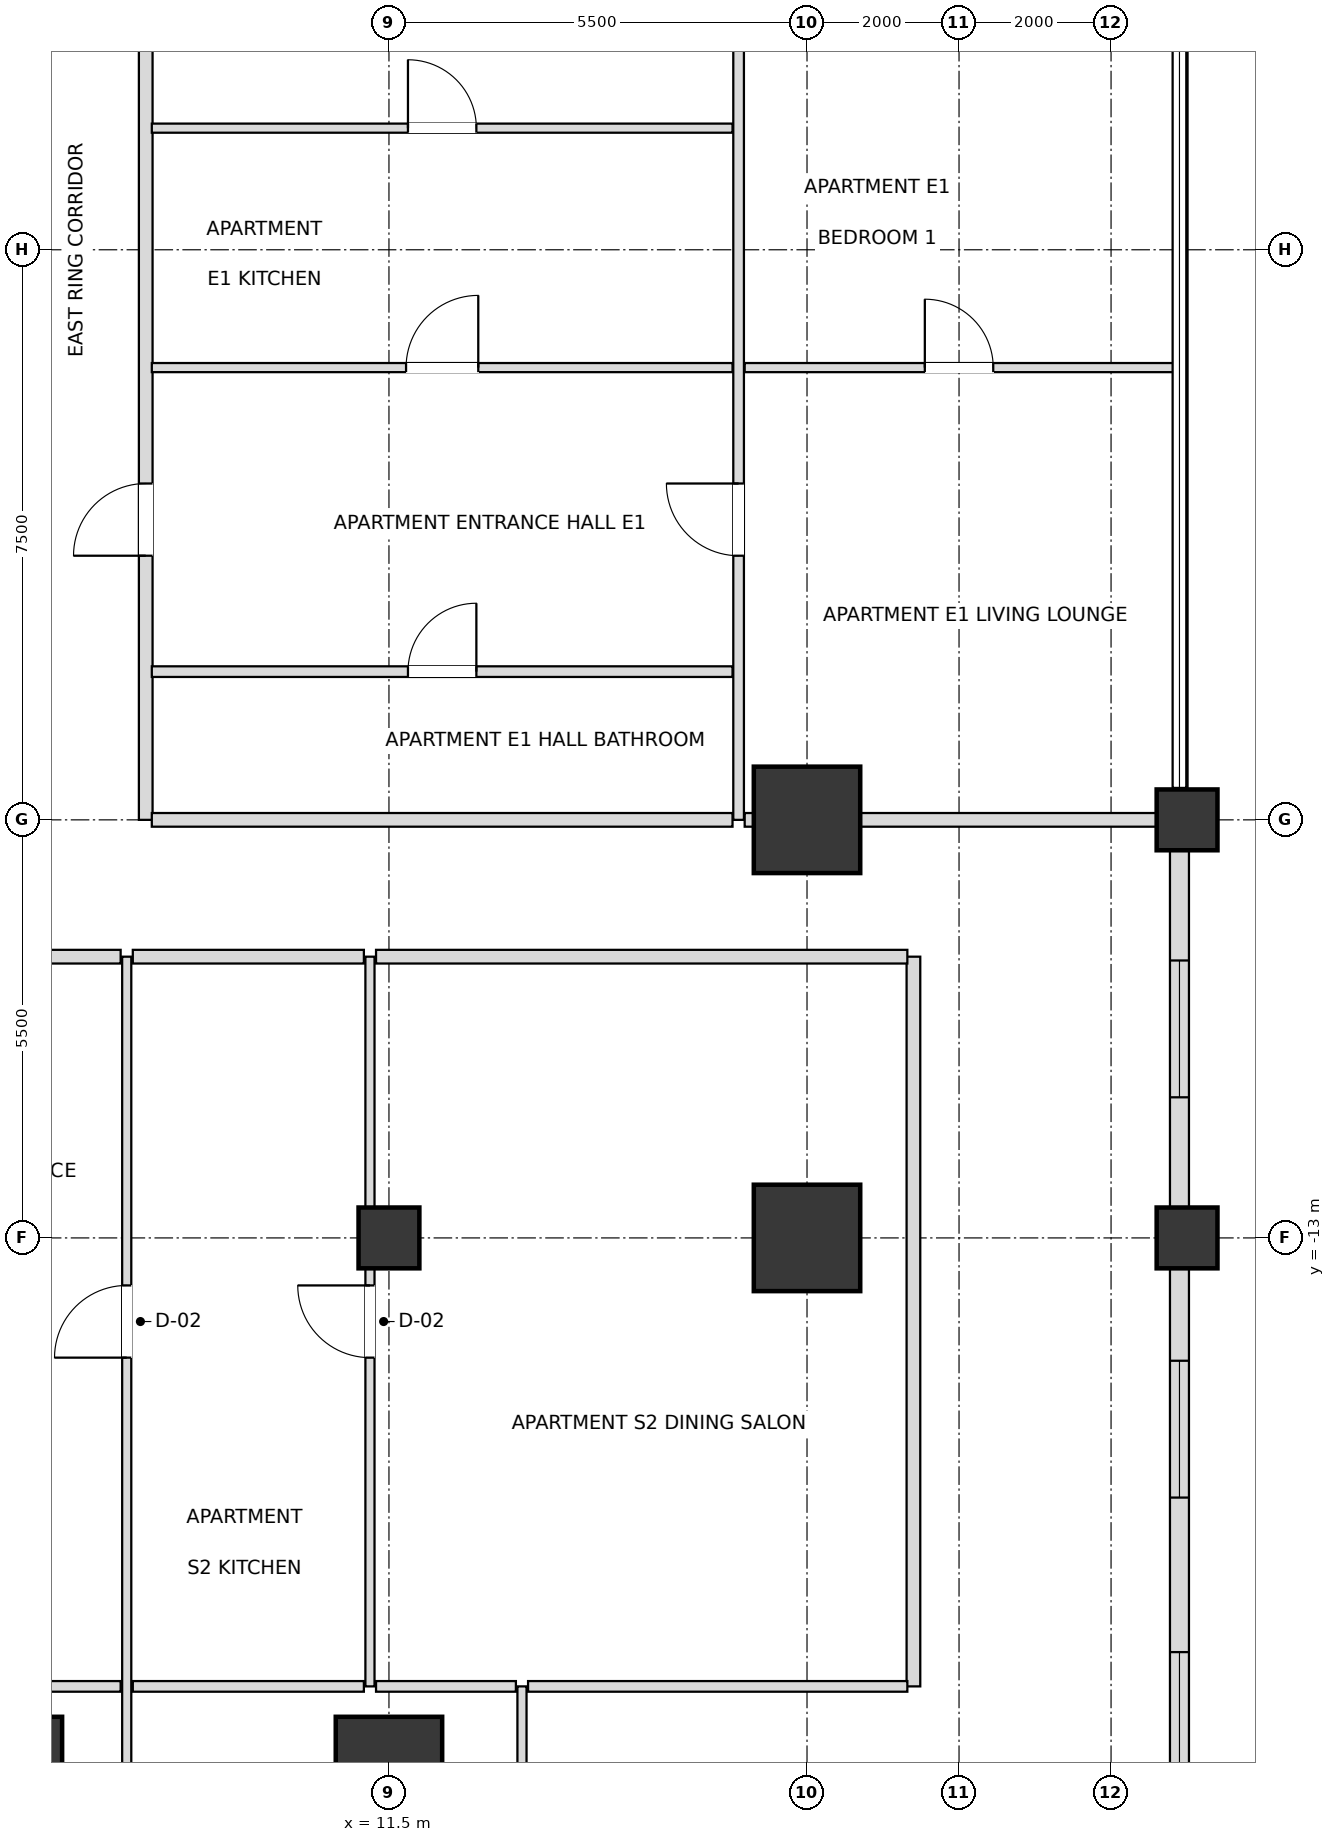
"""IFC4 building model, lengths in metres.
Left out: names, types, materials, properties, quantities, classifications, styles, units other than length and angle.
Written with IfcOpenShell. Run it as: python <this file> out.ifc"""

import sys

from ifc_helpers import new_model, si_unit, direction, frame, frame_2d, origin, origin_2d, place, context, subcontext, project, spatial, rectangle, extrude, element, fill, save


model = new_model("IFC4")
c1 = context("Model", 3, precision=1e-05, world=origin(), true_north=direction((0.0, 1.0)))
c2 = subcontext(c1, "Body", "Model", "MODEL_VIEW")
j1 = project(units=[si_unit("LENGTHUNIT", "METRE"), si_unit("PLANEANGLEUNIT", "RADIAN")], contexts=[c1])
p1 = place(None, origin())
s1 = spatial("IfcSite", under=j1, at=p1, CompositionType="ELEMENT")
p2 = place(p1, origin())
s2 = spatial("IfcBuilding", under=s1, at=p2, CompositionType="ELEMENT")
p3 = place(p2, frame((0.0, 0.0, 54.0)))
s3 = spatial("IfcBuildingStorey", under=s2, at=p3, CompositionType="ELEMENT", Elevation=54.0)
for number, where, z_axis, x_axis in (
    (1, (6.5, -20.0, 0.0), (0.0, 0.0, 1.0), (1.0, 0.0, 0.0)),
    (2, (11.5, -20.0, 0.0), (0.0, 0.0, 1.0), (1.0, 0.0, 0.0)),
    (3, (17.0, -13.0, 0.0), (0.0, 0.0, 1.0), (1.0, 0.0, 0.0)),
    (4, (17.0, -7.5, 0.0), (0.0, 0.0, 1.0), (1.0, 0.0, 0.0)),
):
    element("IfcColumn", number, at=place(p3, frame(where, z_axis=z_axis, x_axis=x_axis)), inside=s3, PredefinedType="USERDEFINED", context=c2, shape_type="SweptSolid", body=[
        extrude(rectangle(XDim=1.4, YDim=1.4, at=origin_2d()), origin(), (0.0, 0.0, 1.0), 3.6),
    ])
for number, where, z_axis, x_axis in (
    (5, (11.5, -13.0, 0.0), (0.0, 0.0, 1.0), (1.0, 0.0, 0.0)),
    (6, (22.0, -13.0, 0.0), (0.0, 0.0, 1.0), (1.0, 0.0, 0.0)),
    (7, (22.0, -7.5, 0.0), (0.0, 0.0, 1.0), (1.0, 0.0, 0.0)),
):
    element("IfcColumn", number, at=place(p3, frame(where, z_axis=z_axis, x_axis=x_axis)), inside=s3, PredefinedType="COLUMN", context=c2, shape_type="SweptSolid", body=[
        extrude(rectangle(XDim=0.8, YDim=0.8, at=origin_2d()), origin(), (0.0, 0.0, 1.0), 3.6),
    ])
p4 = place(p3, frame((21.9, -21.425, 0.0), z_axis=(0.0, 0.0, 1.0), x_axis=(0.0, 1.0, 0.0)))
e8 = element("IfcWall", 8, at=p4, inside=s3, PredefinedType="SOLIDWALL", context=c2, shape_type="SweptSolid", body=[
    extrude(rectangle(XDim=8.03, YDim=0.25, at=frame_2d((4.015, 0.0))), origin(), (0.0, 0.0, 1.0), 2.736),
])
p5 = place(p4, frame((1.176, 0.0, 0.72)))
e9 = element("IfcOpeningElement", 9, at=p5, cuts=e8, PredefinedType="OPENING", context=c2, shape_type="SweptSolid", body=[
    extrude(rectangle(XDim=1.8, YDim=1.68, at=frame_2d((0.9, 0.84))), frame((0.0, 0.135, 0.0), z_axis=(0.0, -1.0, 0.0), x_axis=(1.0, 0.0, 0.0)), (0.0, 0.0, 1.0), 0.27),
])
p6 = place(p4, frame((5.009, 0.0, 0.72)))
e10 = element("IfcOpeningElement", 10, at=p6, cuts=e8, PredefinedType="OPENING", context=c2, shape_type="SweptSolid", body=[
    extrude(rectangle(XDim=1.8, YDim=1.68, at=frame_2d((0.9, 0.84))), frame((0.0, 0.135, 0.0), z_axis=(0.0, -1.0, 0.0), x_axis=(1.0, 0.0, 0.0)), (0.0, 0.0, 1.0), 0.27),
])
p7 = place(p3, frame((21.9, -12.605, 0.0), z_axis=(0.0, 0.0, 1.0), x_axis=(0.0, 1.0, 0.0)))
e11 = element("IfcWall", 11, at=p7, inside=s3, PredefinedType="SOLIDWALL", context=c2, shape_type="SweptSolid", body=[
    extrude(rectangle(XDim=4.71, YDim=0.25, at=frame_2d((2.355, 0.0))), origin(), (0.0, 0.0, 1.0), 2.736),
])
p8 = place(p7, frame((1.455, 0.0, 0.72)))
e12 = element("IfcOpeningElement", 12, at=p8, cuts=e11, PredefinedType="OPENING", context=c2, shape_type="SweptSolid", body=[
    extrude(rectangle(XDim=1.8, YDim=1.68, at=frame_2d((0.9, 0.84))), frame((0.0, 0.135, 0.0), z_axis=(0.0, -1.0, 0.0), x_axis=(1.0, 0.0, 0.0)), (0.0, 0.0, 1.0), 0.27),
])
p9 = place(p3, frame((8.05, -24.9, 0.0), z_axis=(0.0, 0.0, 1.0), x_axis=(0.0, 1.0, 0.0)))
e13 = element("IfcWall", 13, at=p9, inside=s3, PredefinedType="PARTITIONING", context=c2, shape_type="SweptSolid", body=[
    extrude(rectangle(XDim=15.6, YDim=0.12, at=frame_2d((7.8, 0.0))), origin(), (0.0, 0.0, 1.0), 2.816),
])
p10 = place(p9, frame((10.325, 0.0, 0.0)))
e14 = element("IfcOpeningElement", 14, at=p10, cuts=e13, PredefinedType="OPENING", context=c2, shape_type="SweptSolid", body=[
    extrude(rectangle(XDim=0.95, YDim=2.1, at=frame_2d((0.475, 1.05))), frame((0.0, 0.07, 0.0), z_axis=(0.0, -1.0, 0.0), x_axis=(1.0, 0.0, 0.0)), (0.0, 0.0, 1.0), 0.14),
])
p11 = place(p9, frame((2.55, 0.0, 0.0)))
e15 = element("IfcOpeningElement", 15, at=p11, cuts=e13, PredefinedType="OPENING", context=c2, shape_type="SweptSolid", body=[
    extrude(rectangle(XDim=0.9, YDim=2.1, at=frame_2d((0.45, 1.05))), frame((0.0, 0.07, 0.0), z_axis=(0.0, -1.0, 0.0), x_axis=(1.0, 0.0, 0.0)), (0.0, 0.0, 1.0), 0.14),
])
p12 = place(p3, frame((8.3, -7.5, 0.0), z_axis=(0.0, 0.0, 1.0), x_axis=(0.0, 1.0, 0.0)))
e16 = element("IfcWall", 16, at=p12, inside=s3, PredefinedType="PARTITIONING", context=c2, shape_type="SweptSolid", body=[
    extrude(rectangle(XDim=15.0, YDim=0.18, at=frame_2d((7.5, 0.0))), origin(), (0.0, 0.0, 1.0), 3.38),
])
p13 = place(p12, frame((3.475, 0.0, 0.0)))
e17 = element("IfcOpeningElement", 17, at=p13, cuts=e16, PredefinedType="OPENING", context=c2, shape_type="SweptSolid", body=[
    extrude(rectangle(XDim=0.95, YDim=2.15, at=frame_2d((0.475, 1.075))), frame((0.0, 0.1, 0.0), z_axis=(0.0, -1.0, 0.0), x_axis=(1.0, 0.0, 0.0)), (0.0, 0.0, 1.0), 0.2),
])
p14 = place(p3, frame((11.25, -18.9, 0.0), z_axis=(0.0, 0.0, 1.0), x_axis=(0.0, 1.0, 0.0)))
e18 = element("IfcWall", 18, at=p14, inside=s3, PredefinedType="PARTITIONING", context=c2, shape_type="SweptSolid", body=[
    extrude(rectangle(XDim=9.6, YDim=0.12, at=frame_2d((4.8, 0.0))), origin(), (0.0, 0.0, 1.0), 2.736),
])
p15 = place(p14, frame((4.325, 0.0, 0.0)))
e19 = element("IfcOpeningElement", 19, at=p15, cuts=e18, PredefinedType="OPENING", context=c2, shape_type="SweptSolid", body=[
    extrude(rectangle(XDim=0.95, YDim=2.1, at=frame_2d((0.475, 1.05))), frame((0.0, 0.07, 0.0), z_axis=(0.0, -1.0, 0.0), x_axis=(1.0, 0.0, 0.0)), (0.0, 0.0, 1.0), 0.14),
])
p16 = place(p3, frame((13.25, -24.9, 0.0), z_axis=(0.0, 0.0, 1.0), x_axis=(0.0, 1.0, 0.0)))
e20 = element("IfcWall", 20, at=p16, inside=s3, PredefinedType="PARTITIONING", context=c2, shape_type="SweptSolid", body=[
    extrude(rectangle(XDim=6.0, YDim=0.12, at=frame_2d((3.0, 0.0))), origin(), (0.0, 0.0, 1.0), 2.736),
])
p17 = place(p16, frame((2.55, 0.0, 0.0)))
e21 = element("IfcOpeningElement", 21, at=p17, cuts=e20, PredefinedType="OPENING", context=c2, shape_type="SweptSolid", body=[
    extrude(rectangle(XDim=0.9, YDim=2.1, at=frame_2d((0.45, 1.05))), frame((0.0, 0.07, 0.0), z_axis=(0.0, -1.0, 0.0), x_axis=(1.0, 0.0, 0.0)), (0.0, 0.0, 1.0), 0.14),
])
p18 = place(p3, frame((16.1, -7.5, 0.0), z_axis=(0.0, 0.0, 1.0), x_axis=(0.0, 1.0, 0.0)))
e22 = element("IfcWall", 22, at=p18, inside=s3, PredefinedType="PARTITIONING", context=c2, shape_type="SweptSolid", body=[
    extrude(rectangle(XDim=15.0, YDim=0.14, at=frame_2d((7.5, 0.0))), origin(), (0.0, 0.0, 1.0), 3.38),
])
p19 = place(p18, frame((3.475, 0.0, 0.0)))
e23 = element("IfcOpeningElement", 23, at=p19, cuts=e22, PredefinedType="OPENING", context=c2, shape_type="SweptSolid", body=[
    extrude(rectangle(XDim=0.95, YDim=2.1, at=frame_2d((0.475, 1.05))), frame((0.0, 0.08, 0.0), z_axis=(0.0, -1.0, 0.0), x_axis=(1.0, 0.0, 0.0)), (0.0, 0.0, 1.0), 0.16),
])
p20 = place(p3, frame((18.4, -18.9, 0.0), z_axis=(0.0, 0.0, 1.0), x_axis=(0.0, 1.0, 0.0)))
e24 = element("IfcWall", 24, at=p20, inside=s3, PredefinedType="PARTITIONING", context=c2, shape_type="SweptSolid", body=[
    extrude(rectangle(XDim=9.6, YDim=0.18, at=frame_2d((4.8, 0.0))), origin(), (0.0, 0.0, 1.0), 2.736),
])
p21 = place(p3, frame((3.93, -18.9, 0.0), z_axis=(0.0, 0.0, 1.0), x_axis=(1.0, 0.0, 0.0)))
e25 = element("IfcWall", 25, at=p21, inside=s3, PredefinedType="PARTITIONING", context=c2, shape_type="SweptSolid", body=[
    extrude(rectangle(XDim=4.04, YDim=0.14, at=frame_2d((2.02, 0.0))), origin(), (0.0, 0.0, 1.0), 2.816),
])
p22 = place(p21, frame((0.638, 0.0, 0.0)))
e26 = element("IfcOpeningElement", 26, at=p22, cuts=e25, PredefinedType="OPENING", context=c2, shape_type="SweptSolid", body=[
    extrude(rectangle(XDim=0.95, YDim=2.1, at=frame_2d((0.475, 1.05))), frame((0.0, 0.08, 0.0), z_axis=(0.0, -1.0, 0.0), x_axis=(1.0, 0.0, 0.0)), (0.0, 0.0, 1.0), 0.16),
])
p23 = place(p3, frame((8.13, -18.9, 0.0), z_axis=(0.0, 0.0, 1.0), x_axis=(1.0, 0.0, 0.0)))
e27 = element("IfcWall", 27, at=p23, inside=s3, PredefinedType="PARTITIONING", context=c2, shape_type="SweptSolid", body=[
    extrude(rectangle(XDim=3.04, YDim=0.14, at=frame_2d((1.52, 0.0))), origin(), (0.0, 0.0, 1.0), 3.38),
])
p24 = place(p3, frame((11.33, -18.9, 0.0), z_axis=(0.0, 0.0, 1.0), x_axis=(1.0, 0.0, 0.0)))
e28 = element("IfcWall", 28, at=p24, inside=s3, PredefinedType="PARTITIONING", context=c2, shape_type="SweptSolid", body=[
    extrude(rectangle(XDim=1.84, YDim=0.14, at=frame_2d((0.92, 0.0))), origin(), (0.0, 0.0, 1.0), 2.736),
])
p25 = place(p3, frame((13.33, -18.9, 0.0), z_axis=(0.0, 0.0, 1.0), x_axis=(1.0, 0.0, 0.0)))
e29 = element("IfcWall", 29, at=p25, inside=s3, PredefinedType="PARTITIONING", context=c2, shape_type="SweptSolid", body=[
    extrude(rectangle(XDim=4.99, YDim=0.14, at=frame_2d((2.495, 0.0))), origin(), (0.0, 0.0, 1.0), 2.736),
])
p26 = place(p3, frame((3.93, -9.3, 0.0), z_axis=(0.0, 0.0, 1.0), x_axis=(1.0, 0.0, 0.0)))
e30 = element("IfcWall", 30, at=p26, inside=s3, PredefinedType="PARTITIONING", context=c2, shape_type="SweptSolid", body=[
    extrude(rectangle(XDim=4.04, YDim=0.18, at=frame_2d((2.02, 0.0))), origin(), (0.0, 0.0, 1.0), 2.816),
])
p27 = place(p26, frame((1.565, 0.0, 0.0)))
e31 = element("IfcOpeningElement", 31, at=p27, cuts=e30, PredefinedType="OPENING", context=c2, shape_type="SweptSolid", body=[
    extrude(rectangle(XDim=0.95, YDim=2.15, at=frame_2d((0.475, 1.075))), frame((0.0, 0.1, 0.0), z_axis=(0.0, -1.0, 0.0), x_axis=(1.0, 0.0, 0.0)), (0.0, 0.0, 1.0), 0.2),
])
p28 = place(p3, frame((8.13, -9.3, 0.0), z_axis=(0.0, 0.0, 1.0), x_axis=(1.0, 0.0, 0.0)))
e32 = element("IfcWall", 32, at=p28, inside=s3, PredefinedType="PARTITIONING", context=c2, shape_type="SweptSolid", body=[
    extrude(rectangle(XDim=3.04, YDim=0.18, at=frame_2d((1.52, 0.0))), origin(), (0.0, 0.0, 1.0), 3.38),
])
p29 = place(p3, frame((11.33, -9.3, 0.0), z_axis=(0.0, 0.0, 1.0), x_axis=(1.0, 0.0, 0.0)))
e33 = element("IfcWall", 33, at=p29, inside=s3, PredefinedType="PARTITIONING", context=c2, shape_type="SweptSolid", body=[
    extrude(rectangle(XDim=6.99, YDim=0.18, at=frame_2d((3.495, 0.0))), origin(), (0.0, 0.0, 1.0), 2.816),
])
p30 = place(p3, frame((8.38, -7.5, 0.0), z_axis=(0.0, 0.0, 1.0), x_axis=(1.0, 0.0, 0.0)))
e34 = element("IfcWall", 34, at=p30, inside=s3, PredefinedType="PARTITIONING", context=c2, shape_type="SweptSolid", body=[
    extrude(rectangle(XDim=7.64, YDim=0.18, at=frame_2d((3.82, 0.0))), origin(), (0.0, 0.0, 1.0), 2.816),
])
p31 = place(p3, frame((16.18, -7.5, 0.0), z_axis=(0.0, 0.0, 1.0), x_axis=(1.0, 0.0, 0.0)))
e35 = element("IfcWall", 35, at=p31, inside=s3, PredefinedType="PARTITIONING", context=c2, shape_type="SweptSolid", body=[
    extrude(rectangle(XDim=5.72, YDim=0.18, at=frame_2d((2.86, 0.0))), origin(), (0.0, 0.0, 1.0), 2.816),
])
p32 = place(p3, frame((8.38, -5.55, 0.0), z_axis=(0.0, 0.0, 1.0), x_axis=(1.0, 0.0, 0.0)))
e36 = element("IfcWall", 36, at=p32, inside=s3, PredefinedType="PARTITIONING", context=c2, shape_type="SweptSolid", body=[
    extrude(rectangle(XDim=7.64, YDim=0.14, at=frame_2d((3.82, 0.0))), origin(), (0.0, 0.0, 1.0), 2.948),
])
p33 = place(p32, frame((3.37, 0.0, 0.0)))
e37 = element("IfcOpeningElement", 37, at=p33, cuts=e36, PredefinedType="OPENING", context=c2, shape_type="SweptSolid", body=[
    extrude(rectangle(XDim=0.9, YDim=2.1, at=frame_2d((0.45, 1.05))), frame((0.0, 0.08, 0.0), z_axis=(0.0, -1.0, 0.0), x_axis=(1.0, 0.0, 0.0)), (0.0, 0.0, 1.0), 0.16),
])
p34 = place(p3, frame((8.38, -1.55, 0.0), z_axis=(0.0, 0.0, 1.0), x_axis=(1.0, 0.0, 0.0)))
e38 = element("IfcWall", 38, at=p34, inside=s3, PredefinedType="PARTITIONING", context=c2, shape_type="SweptSolid", body=[
    extrude(rectangle(XDim=7.64, YDim=0.12, at=frame_2d((3.82, 0.0))), origin(), (0.0, 0.0, 1.0), 2.948),
])
p35 = place(p34, frame((3.345, 0.0, 0.0)))
e39 = element("IfcOpeningElement", 39, at=p35, cuts=e38, PredefinedType="OPENING", context=c2, shape_type="SweptSolid", body=[
    extrude(rectangle(XDim=0.95, YDim=2.1, at=frame_2d((0.475, 1.05))), frame((0.0, 0.07, 0.0), z_axis=(0.0, -1.0, 0.0), x_axis=(1.0, 0.0, 0.0)), (0.0, 0.0, 1.0), 0.14),
])
p36 = place(p3, frame((16.18, -1.55, 0.0), z_axis=(0.0, 0.0, 1.0), x_axis=(1.0, 0.0, 0.0)))
e40 = element("IfcWall", 40, at=p36, inside=s3, PredefinedType="PARTITIONING", context=c2, shape_type="SweptSolid", body=[
    extrude(rectangle(XDim=5.64, YDim=0.12, at=frame_2d((2.82, 0.0))), origin(), (0.0, 0.0, 1.0), 2.816),
])
p37 = place(p36, frame((2.37, 0.0, 0.0)))
e41 = element("IfcOpeningElement", 41, at=p37, cuts=e40, PredefinedType="OPENING", context=c2, shape_type="SweptSolid", body=[
    extrude(rectangle(XDim=0.9, YDim=2.1, at=frame_2d((0.45, 1.05))), frame((0.0, 0.07, 0.0), z_axis=(0.0, -1.0, 0.0), x_axis=(1.0, 0.0, 0.0)), (0.0, 0.0, 1.0), 0.14),
])
p38 = place(p3, frame((8.38, 1.6, 0.0), z_axis=(0.0, 0.0, 1.0), x_axis=(1.0, 0.0, 0.0)))
e42 = element("IfcWall", 42, at=p38, inside=s3, PredefinedType="PARTITIONING", context=c2, shape_type="SweptSolid", body=[
    extrude(rectangle(XDim=7.64, YDim=0.12, at=frame_2d((3.82, 0.0))), origin(), (0.0, 0.0, 1.0), 2.948),
])
p39 = place(p38, frame((3.37, 0.0, 0.0)))
e43 = element("IfcOpeningElement", 43, at=p39, cuts=e42, PredefinedType="OPENING", context=c2, shape_type="SweptSolid", body=[
    extrude(rectangle(XDim=0.9, YDim=2.1, at=frame_2d((0.45, 1.05))), frame((0.0, 0.07, 0.0), z_axis=(0.0, -1.0, 0.0), x_axis=(1.0, 0.0, 0.0)), (0.0, 0.0, 1.0), 0.14),
])
p40 = place(p5, origin())
e44 = element("IfcWindow", 44, at=p40, inside=s3, PartitioningType="SINGLE_PANEL", PredefinedType="WINDOW", context=c2, shape_type="SweptSolid", body=[
    extrude(rectangle(XDim=1.8, YDim=1.68, at=frame_2d((0.9, 0.84))), frame((0.0, 0.03, 0.0), z_axis=(0.0, -1.0, 0.0), x_axis=(1.0, 0.0, 0.0)), (0.0, 0.0, 1.0), 0.06),
])
fill(e9, e44)
p41 = place(p6, origin())
e45 = element("IfcWindow", 45, at=p41, inside=s3, PartitioningType="SINGLE_PANEL", PredefinedType="WINDOW", context=c2, shape_type="SweptSolid", body=[
    extrude(rectangle(XDim=1.8, YDim=1.68, at=frame_2d((0.9, 0.84))), frame((0.0, 0.03, 0.0), z_axis=(0.0, -1.0, 0.0), x_axis=(1.0, 0.0, 0.0)), (0.0, 0.0, 1.0), 0.06),
])
fill(e10, e45)
p42 = place(p8, origin())
e46 = element("IfcWindow", 46, at=p42, inside=s3, PartitioningType="SINGLE_PANEL", PredefinedType="WINDOW", context=c2, shape_type="SweptSolid", body=[
    extrude(rectangle(XDim=1.8, YDim=1.68, at=frame_2d((0.9, 0.84))), frame((0.0, 0.03, 0.0), z_axis=(0.0, -1.0, 0.0), x_axis=(1.0, 0.0, 0.0)), (0.0, 0.0, 1.0), 0.06),
])
fill(e12, e46)
p43 = place(p10, origin())
e47 = element("IfcDoor", 47, at=p43, inside=s3, OperationType="SINGLE_SWING_LEFT", PredefinedType="DOOR", context=c2, shape_type="SweptSolid", body=[
    extrude(rectangle(XDim=0.95, YDim=2.1, at=frame_2d((0.475, 1.05))), frame((0.0, 0.025, 0.0), z_axis=(0.0, -1.0, 0.0), x_axis=(1.0, 0.0, 0.0)), (0.0, 0.0, 1.0), 0.05),
])
fill(e14, e47)
p44 = place(p15, origin())
e48 = element("IfcDoor", 48, at=p44, inside=s3, OperationType="SINGLE_SWING_RIGHT", PredefinedType="DOOR", context=c2, shape_type="SweptSolid", body=[
    extrude(rectangle(XDim=0.95, YDim=2.1, at=frame_2d((0.475, 1.05))), frame((0.0, 0.025, 0.0), z_axis=(0.0, -1.0, 0.0), x_axis=(1.0, 0.0, 0.0)), (0.0, 0.0, 1.0), 0.05),
])
fill(e19, e48)
p45 = place(p33, origin())
e49 = element("IfcDoor", 49, at=p45, inside=s3, OperationType="SINGLE_SWING_RIGHT", PredefinedType="DOOR", context=c2, shape_type="SweptSolid", body=[
    extrude(rectangle(XDim=0.9, YDim=2.1, at=frame_2d((0.45, 1.05))), frame((0.0, 0.025, 0.0), z_axis=(0.0, -1.0, 0.0), x_axis=(1.0, 0.0, 0.0)), (0.0, 0.0, 1.0), 0.05),
])
fill(e37, e49)
p46 = place(p13, origin())
e50 = element("IfcDoor", 50, at=p46, inside=s3, OperationType="SINGLE_SWING_LEFT", PredefinedType="DOOR", context=c2, shape_type="SweptSolid", body=[
    extrude(rectangle(XDim=0.95, YDim=2.15, at=frame_2d((0.475, 1.075))), frame((0.0, 0.025, 0.0), z_axis=(0.0, -1.0, 0.0), x_axis=(1.0, 0.0, 0.0)), (0.0, 0.0, 1.0), 0.05),
])
fill(e17, e50)
p47 = place(p35, origin())
e51 = element("IfcDoor", 51, at=p47, inside=s3, OperationType="SINGLE_SWING_RIGHT", PredefinedType="DOOR", context=c2, shape_type="SweptSolid", body=[
    extrude(rectangle(XDim=0.95, YDim=2.1, at=frame_2d((0.475, 1.05))), frame((0.0, 0.025, 0.0), z_axis=(0.0, -1.0, 0.0), x_axis=(1.0, 0.0, 0.0)), (0.0, 0.0, 1.0), 0.05),
])
fill(e39, e51)
p48 = place(p39, origin())
e52 = element("IfcDoor", 52, at=p48, inside=s3, OperationType="SINGLE_SWING_LEFT", PredefinedType="DOOR", context=c2, shape_type="SweptSolid", body=[
    extrude(rectangle(XDim=0.9, YDim=2.1, at=frame_2d((0.45, 1.05))), frame((0.0, 0.025, 0.0), z_axis=(0.0, -1.0, 0.0), x_axis=(1.0, 0.0, 0.0)), (0.0, 0.0, 1.0), 0.05),
])
fill(e43, e52)
p49 = place(p19, origin())
e53 = element("IfcDoor", 53, at=p49, inside=s3, OperationType="SINGLE_SWING_RIGHT", PredefinedType="DOOR", context=c2, shape_type="SweptSolid", body=[
    extrude(rectangle(XDim=0.95, YDim=2.1, at=frame_2d((0.475, 1.05))), frame((0.0, 0.025, 0.0), z_axis=(0.0, -1.0, 0.0), x_axis=(1.0, 0.0, 0.0)), (0.0, 0.0, 1.0), 0.05),
])
fill(e23, e53)
p50 = place(p37, origin())
e54 = element("IfcDoor", 54, at=p50, inside=s3, OperationType="SINGLE_SWING_LEFT", PredefinedType="DOOR", context=c2, shape_type="SweptSolid", body=[
    extrude(rectangle(XDim=0.9, YDim=2.1, at=frame_2d((0.45, 1.05))), frame((0.0, 0.025, 0.0), z_axis=(0.0, -1.0, 0.0), x_axis=(1.0, 0.0, 0.0)), (0.0, 0.0, 1.0), 0.05),
])
fill(e41, e54)
save(model, sys.argv[1])
